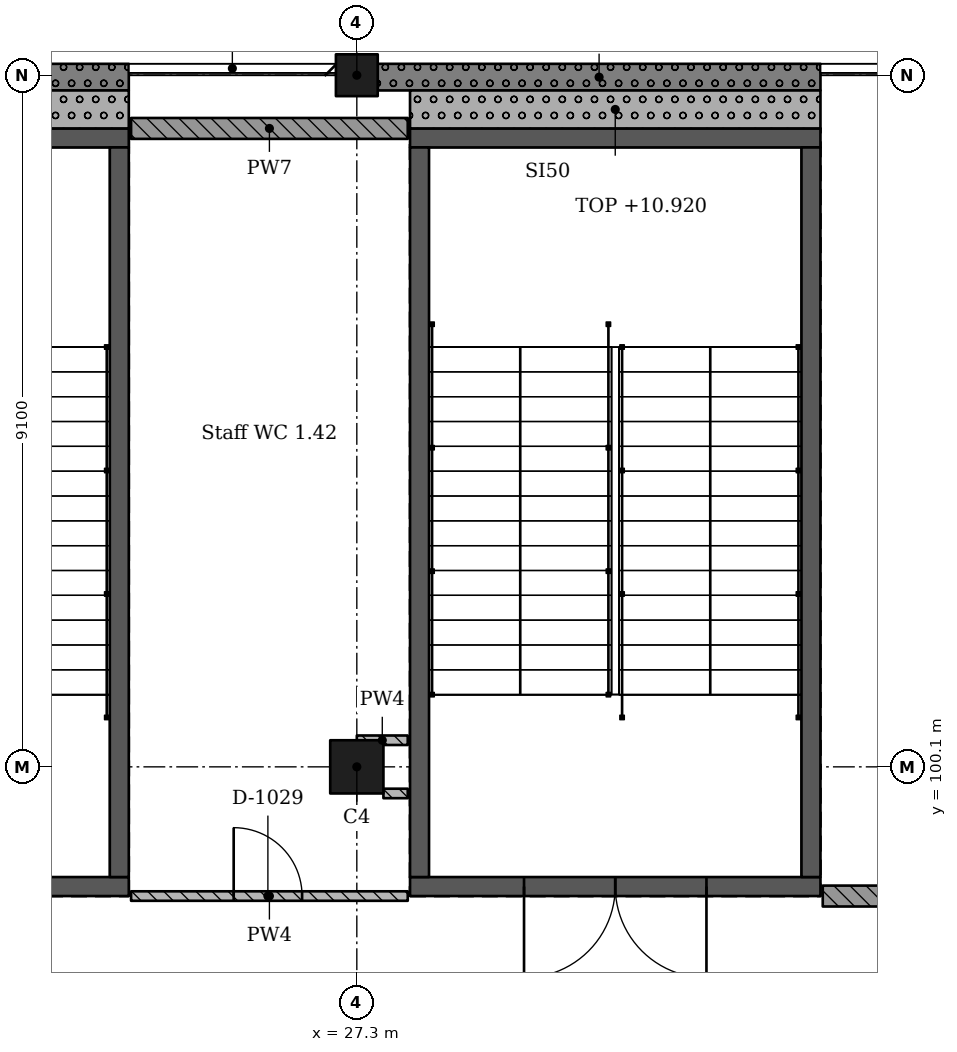
"""IFC4 building model, lengths in metres.
Left out: names, types, materials, properties, quantities, classifications, styles, units other than length and angle.
Written with IfcOpenShell. Run it as: python <this file> out.ifc"""

import sys

from ifc_helpers import new_model, si_unit, direction, frame, frame_2d, origin, origin_2d, place, context, subcontext, project, spatial, rectangle, extrude, element, fill, save


model = new_model("IFC4")
c1 = context("Model", 3, precision=1e-05, world=origin(), true_north=direction((0.0, 1.0)))
c2 = subcontext(c1, "Body", "Model", "MODEL_VIEW")
j1 = project(units=[si_unit("LENGTHUNIT", "METRE"), si_unit("PLANEANGLEUNIT", "RADIAN")], contexts=[c1])
p1 = place(None, origin())
s1 = spatial("IfcSite", under=j1, at=p1, CompositionType="ELEMENT")
p2 = place(p1, origin())
s2 = spatial("IfcBuilding", under=s1, at=p2, CompositionType="ELEMENT")
p3 = place(p2, frame((0.0, 0.0, 6.37)))
s3 = spatial("IfcBuildingStorey", under=s2, at=p3, CompositionType="ELEMENT", Elevation=6.37)
p4 = place(p3, frame((27.3, 100.1, 0.0), z_axis=(0.0, 0.0, 1.0), x_axis=(1.0, 0.0, 0.0)))
e1 = element("IfcColumn", 1, at=p4, inside=s3, PredefinedType="COLUMN", context=c2, shape_type="SweptSolid", body=[
    extrude(rectangle(XDim=0.7, YDim=0.7, at=origin_2d()), origin(), (0.0, 0.0, 1.0), 4.55),
])
p5 = place(p3, frame((27.3, 109.2, 0.0), z_axis=(0.0, 0.0, 1.0), x_axis=(1.0, 0.0, 0.0)))
e2 = element("IfcColumn", 2, at=p5, inside=s3, PredefinedType="COLUMN", context=c2, shape_type="SweptSolid", body=[
    extrude(rectangle(XDim=0.55, YDim=0.55, at=origin_2d()), origin(), (0.0, 0.0, 1.0), 4.55),
])
p6 = place(p3, frame((24.3, 98.525, 0.0), z_axis=(0.0, 0.0, 1.0), x_axis=(-1.0, 0.0, 0.0)))
e3 = element("IfcWall", 3, at=p6, inside=s3, PredefinedType="SHEAR", context=c2, shape_type="SweptSolid", body=[
    extrude(rectangle(XDim=5.4, YDim=0.25, at=frame_2d((2.7, 0.0))), origin(), (0.0, 0.0, 1.0), 4.55),
])
p7 = place(p6, frame((1.5, 0.0, 0.0)))
e4 = element("IfcOpeningElement", 4, at=p7, cuts=e3, PredefinedType="OPENING", context=c2, shape_type="SweptSolid", body=[
    extrude(rectangle(XDim=2.4, YDim=2.1, at=frame_2d((1.2, 1.05))), frame((0.0, 0.135, 0.0), z_axis=(0.0, -1.0, 0.0), x_axis=(1.0, 0.0, 0.0)), (0.0, 0.0, 1.0), 0.27),
])
p8 = place(p3, frame((24.3, 108.375, 0.0), z_axis=(0.0, 0.0, 1.0), x_axis=(-1.0, 0.0, 0.0)))
e5 = element("IfcWall", 5, at=p8, inside=s3, PredefinedType="SHEAR", context=c2, shape_type="SweptSolid", body=[
    extrude(rectangle(XDim=5.4, YDim=0.25, at=frame_2d((2.7, 0.0))), origin(), (0.0, 0.0, 1.0), 4.55),
])
p9 = place(p3, frame((24.175, 108.25, 0.0), z_axis=(0.0, 0.0, 1.0), x_axis=(0.0, -1.0, 0.0)))
e6 = element("IfcWall", 6, at=p9, inside=s3, PredefinedType="SHEAR", context=c2, shape_type="SweptSolid", body=[
    extrude(rectangle(XDim=9.6, YDim=0.25, at=frame_2d((4.8, 0.0))), origin(), (0.0, 0.0, 1.0), 4.55),
])
p10 = place(p3, frame((33.4, 98.525, 0.0), z_axis=(0.0, 0.0, 1.0), x_axis=(-1.0, 0.0, 0.0)))
e7 = element("IfcWall", 7, at=p10, inside=s3, PredefinedType="SHEAR", context=c2, shape_type="SweptSolid", body=[
    extrude(rectangle(XDim=5.4, YDim=0.25, at=frame_2d((2.7, 0.0))), origin(), (0.0, 0.0, 1.0), 4.55),
])
p11 = place(p10, frame((1.5, 0.0, 0.0)))
e8 = element("IfcOpeningElement", 8, at=p11, cuts=e7, PredefinedType="OPENING", context=c2, shape_type="SweptSolid", body=[
    extrude(rectangle(XDim=2.4, YDim=2.1, at=frame_2d((1.2, 1.05))), frame((0.0, 0.135, 0.0), z_axis=(0.0, -1.0, 0.0), x_axis=(1.0, 0.0, 0.0)), (0.0, 0.0, 1.0), 0.27),
])
p12 = place(p3, frame((33.4, 108.375, 0.0), z_axis=(0.0, 0.0, 1.0), x_axis=(-1.0, 0.0, 0.0)))
e9 = element("IfcWall", 9, at=p12, inside=s3, PredefinedType="SHEAR", context=c2, shape_type="SweptSolid", body=[
    extrude(rectangle(XDim=5.4, YDim=0.25, at=frame_2d((2.7, 0.0))), origin(), (0.0, 0.0, 1.0), 4.55),
])
for number, where, z_axis, x_axis in (
    (10, (28.125, 108.25, 0.0), (0.0, 0.0, 1.0), (0.0, -1.0, 0.0)),
    (11, (33.275, 108.25, 0.0), (0.0, 0.0, 1.0), (0.0, -1.0, 0.0)),
):
    element("IfcWall", number, at=place(p3, frame(where, z_axis=z_axis, x_axis=x_axis)), inside=s3, PredefinedType="SHEAR", context=c2, shape_type="SweptSolid", body=[
        extrude(rectangle(XDim=9.6, YDim=0.25, at=frame_2d((4.8, 0.0))), origin(), (0.0, 0.0, 1.0), 4.55),
    ])
for number, where, z_axis, x_axis in (
    (12, (33.4, 109.175, 0.0), (0.0, 0.0, 1.0), (-1.0, 0.0, 0.0)),
    (13, (24.3, 109.175, 0.0), (0.0, 0.0, 1.0), (-1.0, 0.0, 0.0)),
):
    element("IfcWall", number, at=place(p3, frame(where, z_axis=z_axis, x_axis=x_axis)), inside=s3, PredefinedType="SOLIDWALL", context=c2, shape_type="SweptSolid", body=[
        extrude(rectangle(XDim=5.825, YDim=0.35, at=frame_2d((2.913, 0.0))), origin(), (0.0, 0.0, 1.0), 3.5),
    ])
p13 = place(p3, frame((18.9, 108.75, 0.0), z_axis=(0.0, 0.0, 1.0), x_axis=(1.0, 0.0, 0.0)))
e14 = element("IfcWall", 14, at=p13, inside=s3, PredefinedType="SOLIDWALL", context=c2, shape_type="SweptSolid", body=[
    extrude(rectangle(XDim=5.4, YDim=0.5, at=frame_2d((2.7, 0.0))), origin(), (0.0, 0.0, 1.0), 4.55),
])
p14 = place(p3, frame((28.0, 108.75, 0.0), z_axis=(0.0, 0.0, 1.0), x_axis=(1.0, 0.0, 0.0)))
e15 = element("IfcWall", 15, at=p14, inside=s3, PredefinedType="SOLIDWALL", context=c2, shape_type="SweptSolid", body=[
    extrude(rectangle(XDim=5.4, YDim=0.5, at=frame_2d((2.7, 0.0))), origin(), (0.0, 0.0, 1.0), 4.55),
])
p15 = place(p3, frame((24.33, 98.4, 0.0), z_axis=(0.0, 0.0, 1.0), x_axis=(1.0, 0.0, 0.0)))
e16 = element("IfcWall", 16, at=p15, inside=s3, PredefinedType="PARTITIONING", context=c2, shape_type="SweptSolid", body=[
    extrude(rectangle(XDim=3.64, YDim=0.125, at=frame_2d((1.82, 0.0))), origin(), (0.0, 0.0, 1.0), 4.25),
])
p16 = place(p15, frame((1.35, 0.0, 0.0)))
e17 = element("IfcOpeningElement", 17, at=p16, cuts=e16, PredefinedType="OPENING", context=c2, shape_type="SweptSolid", body=[
    extrude(rectangle(XDim=0.9, YDim=2.1, at=frame_2d((0.45, 1.05))), frame((0.0, 0.073, 0.0), z_axis=(0.0, -1.0, 0.0), x_axis=(1.0, 0.0, 0.0)), (0.0, 0.0, 1.0), 0.145),
])
p17 = place(p3, frame((24.33, 108.5, 0.0), z_axis=(0.0, 0.0, 1.0), x_axis=(1.0, 0.0, 0.0)))
e18 = element("IfcWall", 18, at=p17, inside=s3, PredefinedType="SOLIDWALL", context=c2, shape_type="SweptSolid", body=[
    extrude(rectangle(XDim=3.64, YDim=0.275, at=frame_2d((1.82, 0.0))), origin(), (0.0, 0.0, 1.0), 4.25),
])
p18 = place(p3, frame((27.3, 100.45, 0.0), z_axis=(0.0, 0.0, 1.0), x_axis=(1.0, 0.0, 0.0)))
e19 = element("IfcWall", 19, at=p18, inside=s3, PredefinedType="PARTITIONING", context=c2, shape_type="SweptSolid", body=[
    extrude(rectangle(XDim=0.67, YDim=0.125, at=frame_2d((0.335, 0.0))), origin(), (0.0, 0.0, 1.0), 4.25),
])
p19 = place(p3, frame((27.65, 99.75, 0.0), z_axis=(0.0, 0.0, 1.0), x_axis=(1.0, 0.0, 0.0)))
e20 = element("IfcWall", 20, at=p19, inside=s3, PredefinedType="PARTITIONING", context=c2, shape_type="SweptSolid", body=[
    extrude(rectangle(XDim=0.32, YDim=0.125, at=frame_2d((0.16, 0.0))), origin(), (0.0, 0.0, 1.0), 4.25),
])
p20 = place(p3, frame((33.43, 98.4, 0.0), z_axis=(0.0, 0.0, 1.0), x_axis=(1.0, 0.0, 0.0)))
e21 = element("IfcWall", 21, at=p20, inside=s3, PredefinedType="SOLIDWALL", context=c2, shape_type="SweptSolid", body=[
    extrude(rectangle(XDim=2.683, YDim=0.275, at=frame_2d((1.341, 0.0))), origin(), (0.0, 0.0, 1.0), 4.25),
])
p21 = place(p16, origin())
e22 = element("IfcDoor", 22, at=p21, inside=s3, OperationType="SINGLE_SWING_RIGHT", PredefinedType="DOOR", context=c2, shape_type="SweptSolid", body=[
    extrude(rectangle(XDim=0.9, YDim=2.1, at=frame_2d((0.45, 1.05))), frame((0.0, 0.025, 0.0), z_axis=(0.0, -1.0, 0.0), x_axis=(1.0, 0.0, 0.0)), (0.0, 0.0, 1.0), 0.05),
])
fill(e17, e22)
p22 = place(p11, origin())
e23 = element("IfcDoor", 23, at=p22, inside=s3, OperationType="DOUBLE_DOOR_SINGLE_SWING", PredefinedType="DOOR", context=c2, shape_type="SweptSolid", body=[
    extrude(rectangle(XDim=2.4, YDim=2.1, at=frame_2d((1.2, 1.05))), frame((0.0, 0.025, 0.0), z_axis=(0.0, -1.0, 0.0), x_axis=(1.0, 0.0, 0.0)), (0.0, 0.0, 1.0), 0.05),
])
fill(e8, e23)
save(model, sys.argv[1])
